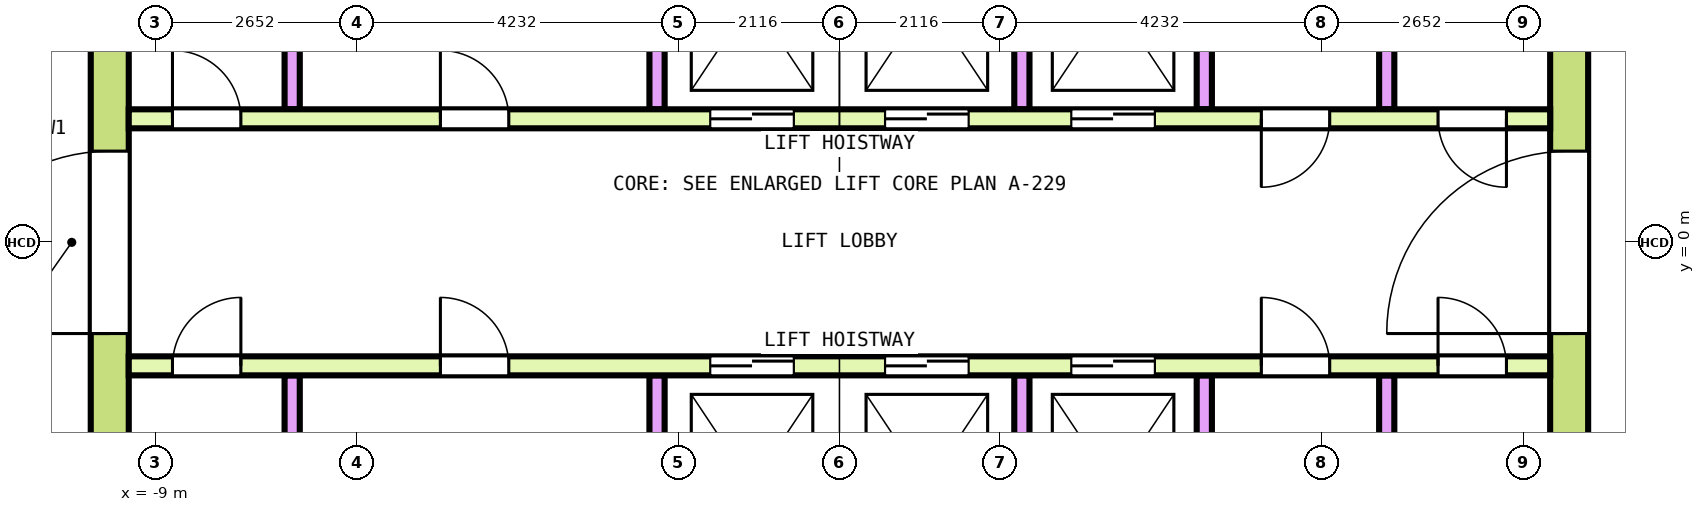
"""IFC4 building model, lengths in metres.
Left out: names, types, materials, properties, quantities, classifications, styles, units other than length and angle.
Written with IfcOpenShell. Run it as: python <this file> out.ifc"""

import sys

from ifc_helpers import new_model, si_unit, direction, frame, frame_2d, origin, place, context, subcontext, project, spatial, rectangle, extrude, element, fill, save


model = new_model("IFC4")
c1 = context("Model", 3, precision=1e-05, world=origin(), true_north=direction((0.0, 1.0)))
c2 = subcontext(c1, "Body", "Model", "MODEL_VIEW")
j1 = project(units=[si_unit("LENGTHUNIT", "METRE"), si_unit("PLANEANGLEUNIT", "RADIAN")], contexts=[c1])
p1 = place(None, origin())
s1 = spatial("IfcSite", under=j1, at=p1, CompositionType="ELEMENT")
p2 = place(p1, origin())
s2 = spatial("IfcBuilding", under=s1, at=p2, CompositionType="ELEMENT")
p3 = place(p2, frame((0.0, 0.0, 332.6)))
s3 = spatial("IfcBuildingStorey", under=s2, at=p3, CompositionType="ELEMENT", Elevation=332.6)
p4 = place(p3, frame((-9.6, -7.85, 0.0), z_axis=(0.0, 0.0, 1.0), x_axis=(0.0, 1.0, 0.0)))
e1 = element("IfcWall", 1, at=p4, inside=s3, PredefinedType="SHEAR", context=c2, shape_type="SweptSolid", body=[
    extrude(rectangle(XDim=15.7, YDim=0.5, at=frame_2d((7.85, 0.0))), origin(), (0.0, 0.0, 1.0), 3.7),
])
p5 = place(p4, frame((6.65, 0.0, 0.0)))
e2 = element("IfcOpeningElement", 2, at=p5, cuts=e1, PredefinedType="OPENING", context=c2, shape_type="SweptSolid", body=[
    extrude(rectangle(XDim=2.4, YDim=2.1, at=frame_2d((1.2, 1.05))), frame((0.0, 0.26, 0.0), z_axis=(0.0, -1.0, 0.0), x_axis=(1.0, 0.0, 0.0)), (0.0, 0.0, 1.0), 0.52),
])
p6 = place(p4, frame((13.55, 0.0, 0.0)))
e3 = element("IfcOpeningElement", 3, at=p6, cuts=e1, PredefinedType="OPENING", context=c2, shape_type="SweptSolid", body=[
    extrude(rectangle(XDim=1.2, YDim=2.1, at=frame_2d((0.6, 1.05))), frame((0.0, 0.26, 0.0), z_axis=(0.0, -1.0, 0.0), x_axis=(1.0, 0.0, 0.0)), (0.0, 0.0, 1.0), 0.52),
])
p7 = place(p4, frame((0.95, 0.0, 0.0)))
e4 = element("IfcOpeningElement", 4, at=p7, cuts=e1, PredefinedType="OPENING", context=c2, shape_type="SweptSolid", body=[
    extrude(rectangle(XDim=1.2, YDim=2.1, at=frame_2d((0.6, 1.05))), frame((0.0, 0.26, 0.0), z_axis=(0.0, -1.0, 0.0), x_axis=(1.0, 0.0, 0.0)), (0.0, 0.0, 1.0), 0.52),
])
p8 = place(p3, frame((9.6, -7.85, 0.0), z_axis=(0.0, 0.0, 1.0), x_axis=(0.0, 1.0, 0.0)))
e5 = element("IfcWall", 5, at=p8, inside=s3, PredefinedType="SHEAR", context=c2, shape_type="SweptSolid", body=[
    extrude(rectangle(XDim=15.7, YDim=0.5, at=frame_2d((7.85, 0.0))), origin(), (0.0, 0.0, 1.0), 3.7),
])
p9 = place(p8, frame((6.65, 0.0, 0.0)))
e6 = element("IfcOpeningElement", 6, at=p9, cuts=e5, PredefinedType="OPENING", context=c2, shape_type="SweptSolid", body=[
    extrude(rectangle(XDim=2.4, YDim=2.1, at=frame_2d((1.2, 1.05))), frame((0.0, 0.26, 0.0), z_axis=(0.0, -1.0, 0.0), x_axis=(1.0, 0.0, 0.0)), (0.0, 0.0, 1.0), 0.52),
])
p10 = place(p8, frame((13.55, 0.0, 0.0)))
e7 = element("IfcOpeningElement", 7, at=p10, cuts=e5, PredefinedType="OPENING", context=c2, shape_type="SweptSolid", body=[
    extrude(rectangle(XDim=1.2, YDim=2.1, at=frame_2d((0.6, 1.05))), frame((0.0, 0.26, 0.0), z_axis=(0.0, -1.0, 0.0), x_axis=(1.0, 0.0, 0.0)), (0.0, 0.0, 1.0), 0.52),
])
p11 = place(p8, frame((1.05, 0.0, 0.0)))
e8 = element("IfcOpeningElement", 8, at=p11, cuts=e5, PredefinedType="OPENING", context=c2, shape_type="SweptSolid", body=[
    extrude(rectangle(XDim=1.0, YDim=2.1, at=frame_2d((0.5, 1.05))), frame((0.0, 0.26, 0.0), z_axis=(0.0, -1.0, 0.0), x_axis=(1.0, 0.0, 0.0)), (0.0, 0.0, 1.0), 0.52),
])
p12 = place(p3, frame((-9.35, 1.625, 0.0), z_axis=(0.0, 0.0, 1.0), x_axis=(1.0, 0.0, 0.0)))
e9 = element("IfcWall", 9, at=p12, inside=s3, PredefinedType="SOLIDWALL", context=c2, shape_type="SweptSolid", body=[
    extrude(rectangle(XDim=18.7, YDim=0.25, at=frame_2d((9.35, 0.0))), origin(), (0.0, 0.0, 1.0), 3.7),
])
p13 = place(p12, frame((7.65, 0.0, 0.0)))
e10 = element("IfcOpeningElement", 10, at=p13, cuts=e9, PredefinedType="OPENING", context=c2, shape_type="SweptSolid", body=[
    extrude(rectangle(XDim=1.1, YDim=2.1, at=frame_2d((0.55, 1.05))), frame((0.0, 0.135, 0.0), z_axis=(0.0, -1.0, 0.0), x_axis=(1.0, 0.0, 0.0)), (0.0, 0.0, 1.0), 0.27),
])
p14 = place(p12, frame((9.95, 0.0, 0.0)))
e11 = element("IfcOpeningElement", 11, at=p14, cuts=e9, PredefinedType="OPENING", context=c2, shape_type="SweptSolid", body=[
    extrude(rectangle(XDim=1.1, YDim=2.1, at=frame_2d((0.55, 1.05))), frame((0.0, 0.135, 0.0), z_axis=(0.0, -1.0, 0.0), x_axis=(1.0, 0.0, 0.0)), (0.0, 0.0, 1.0), 0.27),
])
p15 = place(p12, frame((12.4, 0.0, 0.0)))
e12 = element("IfcOpeningElement", 12, at=p15, cuts=e9, PredefinedType="OPENING", context=c2, shape_type="SweptSolid", body=[
    extrude(rectangle(XDim=1.1, YDim=2.1, at=frame_2d((0.55, 1.05))), frame((0.0, 0.135, 0.0), z_axis=(0.0, -1.0, 0.0), x_axis=(1.0, 0.0, 0.0)), (0.0, 0.0, 1.0), 0.27),
])
p16 = place(p12, frame((0.575, 0.0, 0.0)))
e13 = element("IfcOpeningElement", 13, at=p16, cuts=e9, PredefinedType="OPENING", context=c2, shape_type="SweptSolid", body=[
    extrude(rectangle(XDim=0.9, YDim=2.1, at=frame_2d((0.45, 1.05))), frame((0.0, 0.135, 0.0), z_axis=(0.0, -1.0, 0.0), x_axis=(1.0, 0.0, 0.0)), (0.0, 0.0, 1.0), 0.27),
])
p17 = place(p12, frame((4.1, 0.0, 0.0)))
e14 = element("IfcOpeningElement", 14, at=p17, cuts=e9, PredefinedType="OPENING", context=c2, shape_type="SweptSolid", body=[
    extrude(rectangle(XDim=0.9, YDim=2.1, at=frame_2d((0.45, 1.05))), frame((0.0, 0.135, 0.0), z_axis=(0.0, -1.0, 0.0), x_axis=(1.0, 0.0, 0.0)), (0.0, 0.0, 1.0), 0.27),
])
p18 = place(p12, frame((14.9, 0.0, 0.0)))
e15 = element("IfcOpeningElement", 15, at=p18, cuts=e9, PredefinedType="OPENING", context=c2, shape_type="SweptSolid", body=[
    extrude(rectangle(XDim=0.9, YDim=2.1, at=frame_2d((0.45, 1.05))), frame((0.0, 0.135, 0.0), z_axis=(0.0, -1.0, 0.0), x_axis=(1.0, 0.0, 0.0)), (0.0, 0.0, 1.0), 0.27),
])
p19 = place(p12, frame((17.225, 0.0, 0.0)))
e16 = element("IfcOpeningElement", 16, at=p19, cuts=e9, PredefinedType="OPENING", context=c2, shape_type="SweptSolid", body=[
    extrude(rectangle(XDim=0.9, YDim=2.1, at=frame_2d((0.45, 1.05))), frame((0.0, 0.135, 0.0), z_axis=(0.0, -1.0, 0.0), x_axis=(1.0, 0.0, 0.0)), (0.0, 0.0, 1.0), 0.27),
])
for number, where, z_axis, x_axis in (
    (17, (-7.2, 1.75, 0.0), (0.0, 0.0, 1.0), (0.0, 1.0, 0.0)),
    (18, (-2.4, 1.75, 0.0), (0.0, 0.0, 1.0), (0.0, 1.0, 0.0)),
    (19, (2.4, 1.75, 0.0), (0.0, 0.0, 1.0), (0.0, 1.0, 0.0)),
    (20, (4.8, 1.75, 0.0), (0.0, 0.0, 1.0), (0.0, 1.0, 0.0)),
    (21, (7.2, 1.75, 0.0), (0.0, 0.0, 1.0), (0.0, 1.0, 0.0)),
):
    element("IfcWall", number, at=place(p3, frame(where, z_axis=z_axis, x_axis=x_axis)), inside=s3, PredefinedType="SOLIDWALL", context=c2, shape_type="SweptSolid", body=[
        extrude(rectangle(XDim=2.9, YDim=0.2, at=frame_2d((1.45, 0.0))), origin(), (0.0, 0.0, 1.0), 3.7),
    ])
p20 = place(p3, frame((-9.35, -1.625, 0.0), z_axis=(0.0, 0.0, 1.0), x_axis=(1.0, 0.0, 0.0)))
e22 = element("IfcWall", 22, at=p20, inside=s3, PredefinedType="SOLIDWALL", context=c2, shape_type="SweptSolid", body=[
    extrude(rectangle(XDim=18.7, YDim=0.25, at=frame_2d((9.35, 0.0))), origin(), (0.0, 0.0, 1.0), 3.7),
])
p21 = place(p20, frame((7.65, 0.0, 0.0)))
e23 = element("IfcOpeningElement", 23, at=p21, cuts=e22, PredefinedType="OPENING", context=c2, shape_type="SweptSolid", body=[
    extrude(rectangle(XDim=1.1, YDim=2.1, at=frame_2d((0.55, 1.05))), frame((0.0, 0.135, 0.0), z_axis=(0.0, -1.0, 0.0), x_axis=(1.0, 0.0, 0.0)), (0.0, 0.0, 1.0), 0.27),
])
p22 = place(p20, frame((9.95, 0.0, 0.0)))
e24 = element("IfcOpeningElement", 24, at=p22, cuts=e22, PredefinedType="OPENING", context=c2, shape_type="SweptSolid", body=[
    extrude(rectangle(XDim=1.1, YDim=2.1, at=frame_2d((0.55, 1.05))), frame((0.0, 0.135, 0.0), z_axis=(0.0, -1.0, 0.0), x_axis=(1.0, 0.0, 0.0)), (0.0, 0.0, 1.0), 0.27),
])
p23 = place(p20, frame((12.4, 0.0, 0.0)))
e25 = element("IfcOpeningElement", 25, at=p23, cuts=e22, PredefinedType="OPENING", context=c2, shape_type="SweptSolid", body=[
    extrude(rectangle(XDim=1.1, YDim=2.1, at=frame_2d((0.55, 1.05))), frame((0.0, 0.135, 0.0), z_axis=(0.0, -1.0, 0.0), x_axis=(1.0, 0.0, 0.0)), (0.0, 0.0, 1.0), 0.27),
])
p24 = place(p20, frame((0.575, 0.0, 0.0)))
e26 = element("IfcOpeningElement", 26, at=p24, cuts=e22, PredefinedType="OPENING", context=c2, shape_type="SweptSolid", body=[
    extrude(rectangle(XDim=0.9, YDim=2.1, at=frame_2d((0.45, 1.05))), frame((0.0, 0.135, 0.0), z_axis=(0.0, -1.0, 0.0), x_axis=(1.0, 0.0, 0.0)), (0.0, 0.0, 1.0), 0.27),
])
p25 = place(p20, frame((4.1, 0.0, 0.0)))
e27 = element("IfcOpeningElement", 27, at=p25, cuts=e22, PredefinedType="OPENING", context=c2, shape_type="SweptSolid", body=[
    extrude(rectangle(XDim=0.9, YDim=2.1, at=frame_2d((0.45, 1.05))), frame((0.0, 0.135, 0.0), z_axis=(0.0, -1.0, 0.0), x_axis=(1.0, 0.0, 0.0)), (0.0, 0.0, 1.0), 0.27),
])
p26 = place(p20, frame((14.9, 0.0, 0.0)))
e28 = element("IfcOpeningElement", 28, at=p26, cuts=e22, PredefinedType="OPENING", context=c2, shape_type="SweptSolid", body=[
    extrude(rectangle(XDim=0.9, YDim=2.1, at=frame_2d((0.45, 1.05))), frame((0.0, 0.135, 0.0), z_axis=(0.0, -1.0, 0.0), x_axis=(1.0, 0.0, 0.0)), (0.0, 0.0, 1.0), 0.27),
])
p27 = place(p20, frame((17.225, 0.0, 0.0)))
e29 = element("IfcOpeningElement", 29, at=p27, cuts=e22, PredefinedType="OPENING", context=c2, shape_type="SweptSolid", body=[
    extrude(rectangle(XDim=0.9, YDim=2.1, at=frame_2d((0.45, 1.05))), frame((0.0, 0.135, 0.0), z_axis=(0.0, -1.0, 0.0), x_axis=(1.0, 0.0, 0.0)), (0.0, 0.0, 1.0), 0.27),
])
for number, where, z_axis, x_axis in (
    (30, (-7.2, -4.65, 0.0), (0.0, 0.0, 1.0), (0.0, 1.0, 0.0)),
    (31, (-2.4, -4.65, 0.0), (0.0, 0.0, 1.0), (0.0, 1.0, 0.0)),
    (32, (2.4, -4.65, 0.0), (0.0, 0.0, 1.0), (0.0, 1.0, 0.0)),
    (33, (4.8, -4.65, 0.0), (0.0, 0.0, 1.0), (0.0, 1.0, 0.0)),
    (34, (7.2, -4.65, 0.0), (0.0, 0.0, 1.0), (0.0, 1.0, 0.0)),
):
    element("IfcWall", number, at=place(p3, frame(where, z_axis=z_axis, x_axis=x_axis)), inside=s3, PredefinedType="SOLIDWALL", context=c2, shape_type="SweptSolid", body=[
        extrude(rectangle(XDim=2.9, YDim=0.2, at=frame_2d((1.45, 0.0))), origin(), (0.0, 0.0, 1.0), 3.7),
    ])
p28 = place(p13, origin())
e35 = element("IfcDoor", 35, at=p28, inside=s3, OperationType="DOUBLE_DOOR_SLIDING", PredefinedType="DOOR", context=c2, shape_type="SweptSolid", body=[
    extrude(rectangle(XDim=1.1, YDim=2.1, at=frame_2d((0.55, 1.05))), frame((0.0, 0.075, 0.0), z_axis=(0.0, -1.0, 0.0), x_axis=(1.0, 0.0, 0.0)), (0.0, 0.0, 1.0), 0.15),
])
fill(e10, e35)
p29 = place(p14, origin())
e36 = element("IfcDoor", 36, at=p29, inside=s3, OperationType="DOUBLE_DOOR_SLIDING", PredefinedType="DOOR", context=c2, shape_type="SweptSolid", body=[
    extrude(rectangle(XDim=1.1, YDim=2.1, at=frame_2d((0.55, 1.05))), frame((0.0, 0.075, 0.0), z_axis=(0.0, -1.0, 0.0), x_axis=(1.0, 0.0, 0.0)), (0.0, 0.0, 1.0), 0.15),
])
fill(e11, e36)
p30 = place(p15, origin())
e37 = element("IfcDoor", 37, at=p30, inside=s3, OperationType="DOUBLE_DOOR_SLIDING", PredefinedType="DOOR", context=c2, shape_type="SweptSolid", body=[
    extrude(rectangle(XDim=1.1, YDim=2.1, at=frame_2d((0.55, 1.05))), frame((0.0, 0.075, 0.0), z_axis=(0.0, -1.0, 0.0), x_axis=(1.0, 0.0, 0.0)), (0.0, 0.0, 1.0), 0.15),
])
fill(e12, e37)
p31 = place(p21, origin())
e38 = element("IfcDoor", 38, at=p31, inside=s3, OperationType="DOUBLE_DOOR_SLIDING", PredefinedType="DOOR", context=c2, shape_type="SweptSolid", body=[
    extrude(rectangle(XDim=1.1, YDim=2.1, at=frame_2d((0.55, 1.05))), frame((0.0, 0.075, 0.0), z_axis=(0.0, -1.0, 0.0), x_axis=(1.0, 0.0, 0.0)), (0.0, 0.0, 1.0), 0.15),
])
fill(e23, e38)
p32 = place(p22, origin())
e39 = element("IfcDoor", 39, at=p32, inside=s3, OperationType="DOUBLE_DOOR_SLIDING", PredefinedType="DOOR", context=c2, shape_type="SweptSolid", body=[
    extrude(rectangle(XDim=1.1, YDim=2.1, at=frame_2d((0.55, 1.05))), frame((0.0, 0.075, 0.0), z_axis=(0.0, -1.0, 0.0), x_axis=(1.0, 0.0, 0.0)), (0.0, 0.0, 1.0), 0.15),
])
fill(e24, e39)
p33 = place(p23, origin())
e40 = element("IfcDoor", 40, at=p33, inside=s3, OperationType="DOUBLE_DOOR_SLIDING", PredefinedType="DOOR", context=c2, shape_type="SweptSolid", body=[
    extrude(rectangle(XDim=1.1, YDim=2.1, at=frame_2d((0.55, 1.05))), frame((0.0, 0.075, 0.0), z_axis=(0.0, -1.0, 0.0), x_axis=(1.0, 0.0, 0.0)), (0.0, 0.0, 1.0), 0.15),
])
fill(e25, e40)
p34 = place(p5, origin())
e41 = element("IfcDoor", 41, at=p34, inside=s3, OperationType="DOUBLE_DOOR_SINGLE_SWING", PredefinedType="DOOR", context=c2, shape_type="SweptSolid", body=[
    extrude(rectangle(XDim=2.4, YDim=2.1, at=frame_2d((1.2, 1.05))), frame((0.0, 0.2, 0.0), z_axis=(0.0, -1.0, 0.0), x_axis=(1.0, 0.0, 0.0)), (0.0, 0.0, 1.0), 0.4),
])
fill(e2, e41)
p35 = place(p9, origin())
e42 = element("IfcDoor", 42, at=p35, inside=s3, OperationType="DOUBLE_DOOR_SINGLE_SWING", PredefinedType="DOOR", context=c2, shape_type="SweptSolid", body=[
    extrude(rectangle(XDim=2.4, YDim=2.1, at=frame_2d((1.2, 1.05))), frame((0.0, 0.2, 0.0), z_axis=(0.0, -1.0, 0.0), x_axis=(1.0, 0.0, 0.0)), (0.0, 0.0, 1.0), 0.4),
])
fill(e6, e42)
p36 = place(p16, origin())
e43 = element("IfcDoor", 43, at=p36, inside=s3, OperationType="SINGLE_SWING_RIGHT", PredefinedType="DOOR", context=c2, shape_type="SweptSolid", body=[
    extrude(rectangle(XDim=0.9, YDim=2.1, at=frame_2d((0.45, 1.05))), frame((0.0, 0.075, 0.0), z_axis=(0.0, -1.0, 0.0), x_axis=(1.0, 0.0, 0.0)), (0.0, 0.0, 1.0), 0.15),
])
fill(e13, e43)
p37 = place(p17, origin())
e44 = element("IfcDoor", 44, at=p37, inside=s3, OperationType="SINGLE_SWING_LEFT", PredefinedType="DOOR", context=c2, shape_type="SweptSolid", body=[
    extrude(rectangle(XDim=0.9, YDim=2.1, at=frame_2d((0.45, 1.05))), frame((0.0, 0.075, 0.0), z_axis=(0.0, -1.0, 0.0), x_axis=(1.0, 0.0, 0.0)), (0.0, 0.0, 1.0), 0.15),
])
fill(e14, e44)
p38 = place(p18, origin())
e45 = element("IfcDoor", 45, at=p38, inside=s3, OperationType="SINGLE_SWING_RIGHT", PredefinedType="DOOR", context=c2, shape_type="SweptSolid", body=[
    extrude(rectangle(XDim=0.9, YDim=2.1, at=frame_2d((0.45, 1.05))), frame((0.0, 0.075, 0.0), z_axis=(0.0, -1.0, 0.0), x_axis=(1.0, 0.0, 0.0)), (0.0, 0.0, 1.0), 0.15),
])
fill(e15, e45)
p39 = place(p19, origin())
e46 = element("IfcDoor", 46, at=p39, inside=s3, OperationType="SINGLE_SWING_LEFT", PredefinedType="DOOR", context=c2, shape_type="SweptSolid", body=[
    extrude(rectangle(XDim=0.9, YDim=2.1, at=frame_2d((0.45, 1.05))), frame((0.0, 0.075, 0.0), z_axis=(0.0, -1.0, 0.0), x_axis=(1.0, 0.0, 0.0)), (0.0, 0.0, 1.0), 0.15),
])
fill(e16, e46)
p40 = place(p24, origin())
e47 = element("IfcDoor", 47, at=p40, inside=s3, OperationType="SINGLE_SWING_RIGHT", PredefinedType="DOOR", context=c2, shape_type="SweptSolid", body=[
    extrude(rectangle(XDim=0.9, YDim=2.1, at=frame_2d((0.45, 1.05))), frame((0.0, 0.075, 0.0), z_axis=(0.0, -1.0, 0.0), x_axis=(1.0, 0.0, 0.0)), (0.0, 0.0, 1.0), 0.15),
])
fill(e26, e47)
p41 = place(p25, origin())
e48 = element("IfcDoor", 48, at=p41, inside=s3, OperationType="SINGLE_SWING_LEFT", PredefinedType="DOOR", context=c2, shape_type="SweptSolid", body=[
    extrude(rectangle(XDim=0.9, YDim=2.1, at=frame_2d((0.45, 1.05))), frame((0.0, 0.075, 0.0), z_axis=(0.0, -1.0, 0.0), x_axis=(1.0, 0.0, 0.0)), (0.0, 0.0, 1.0), 0.15),
])
fill(e27, e48)
p42 = place(p26, origin())
e49 = element("IfcDoor", 49, at=p42, inside=s3, OperationType="SINGLE_SWING_RIGHT", PredefinedType="DOOR", context=c2, shape_type="SweptSolid", body=[
    extrude(rectangle(XDim=0.9, YDim=2.1, at=frame_2d((0.45, 1.05))), frame((0.0, 0.075, 0.0), z_axis=(0.0, -1.0, 0.0), x_axis=(1.0, 0.0, 0.0)), (0.0, 0.0, 1.0), 0.15),
])
fill(e28, e49)
p43 = place(p27, origin())
e50 = element("IfcDoor", 50, at=p43, inside=s3, OperationType="SINGLE_SWING_LEFT", PredefinedType="DOOR", context=c2, shape_type="SweptSolid", body=[
    extrude(rectangle(XDim=0.9, YDim=2.1, at=frame_2d((0.45, 1.05))), frame((0.0, 0.075, 0.0), z_axis=(0.0, -1.0, 0.0), x_axis=(1.0, 0.0, 0.0)), (0.0, 0.0, 1.0), 0.15),
])
fill(e29, e50)
save(model, sys.argv[1])
